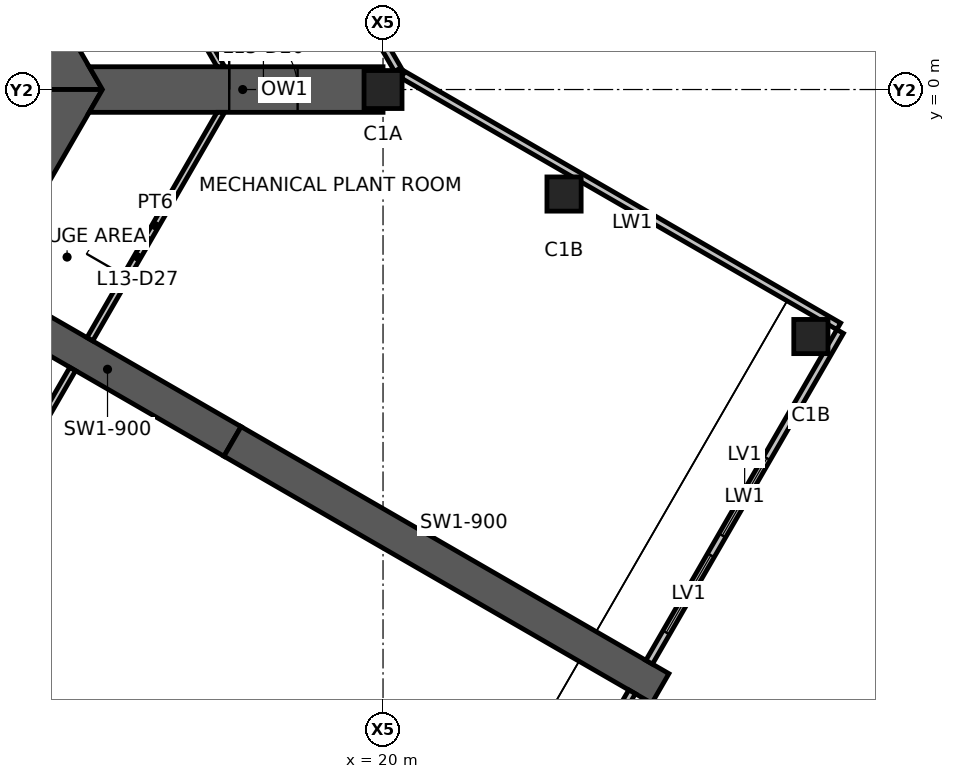
"""IFC4 building model, lengths in metres.
Left out: names, types, materials, properties, quantities, classifications, styles, units other than length and angle.
Written with IfcOpenShell. Run it as: python <this file> out.ifc"""

import sys

from ifc_helpers import new_model, si_unit, direction, frame, frame_2d, origin, origin_2d, place, context, subcontext, project, spatial, polyline, rectangle, hollow_rectangle, outline, extrude, element, fill, save


model = new_model("IFC4")
c1 = context("Model", 3, precision=1e-05, world=origin(), true_north=direction((0.0, 1.0)))
c2 = subcontext(c1, "Body", "Model", "MODEL_VIEW")
j1 = project(units=[si_unit("LENGTHUNIT", "METRE"), si_unit("PLANEANGLEUNIT", "RADIAN")], contexts=[c1])
p1 = place(None, origin())
s1 = spatial("IfcSite", under=j1, at=p1, CompositionType="ELEMENT")
p2 = place(p1, origin())
s2 = spatial("IfcBuilding", under=s1, at=p2, CompositionType="ELEMENT")
p3 = place(p2, frame((0.0, 0.0, 52.0)))
s3 = spatial("IfcBuildingStorey", under=s2, at=p3, CompositionType="ELEMENT", Elevation=52.0)
p4 = place(p3, frame((20.0, 0.0, 0.0), z_axis=(0.0, 0.0, 1.0), x_axis=(1.0, 0.0, 0.0)))
e1 = element("IfcColumn", 1, at=p4, inside=s3, PredefinedType="COLUMN", context=c2, shape_type="SweptSolid", body=[
    extrude(hollow_rectangle(XDim=1.0, YDim=1.0, WallThickness=0.06, at=origin_2d()), origin(), (0.0, 0.0, 1.0), 5.0),
])
for number, where, z_axis, x_axis in (
    (2, (24.763, -2.75, 0.0), (0.0, 0.0, 1.0), (1.0, 0.0, 0.0)),
    (3, (31.258, -6.5, 0.0), (0.0, 0.0, 1.0), (1.0, 0.0, 0.0)),
):
    element("IfcColumn", number, at=place(p3, frame(where, z_axis=z_axis, x_axis=x_axis)), inside=s3, PredefinedType="COLUMN", context=c2, shape_type="SweptSolid", body=[
        extrude(hollow_rectangle(XDim=0.9, YDim=0.9, WallThickness=0.05, at=origin_2d()), origin(), (0.0, 0.0, 1.0), 5.0),
    ])
p5 = place(p3, frame((11.922, 0.0, 0.0), z_axis=(0.0, 0.0, 1.0), x_axis=(-0.500004296715, 0.866022923061, 0.0)))
e4 = element("IfcWall", 4, at=p5, inside=s3, PredefinedType="SHEAR", context=c2, shape_type="SweptSolid", body=[
    extrude(outline(polyline([(-0.346, -0.6), (5.835, -0.6), (6.635, -0.6), (12.269, -0.6), (11.576, 0.6), (6.635, 0.6), (5.835, 0.6), (0.346, 0.6), (-0.346, -0.6)])), origin(), (0.0, 0.0, 1.0), 5.0),
])
p6 = place(p5, frame((5.835, 0.0, 0.0)))
e5 = element("IfcOpeningElement", 5, at=p6, cuts=e4, PredefinedType="OPENING", context=c2, shape_type="SweptSolid", body=[
    extrude(rectangle(XDim=0.8, YDim=2.1, at=frame_2d((0.4, 1.05))), frame((0.0, 0.61, 0.0), z_axis=(0.0, -1.0, 0.0), x_axis=(1.0, 0.0, 0.0)), (0.0, 0.0, 1.0), 1.22),
])
p7 = place(p3, frame((5.961, -10.325, 0.0), z_axis=(0.0, 0.0, 1.0), x_axis=(0.500004296715, 0.866022923061, 0.0)))
e6 = element("IfcWall", 6, at=p7, inside=s3, PredefinedType="SHEAR", context=c2, shape_type="SweptSolid", body=[
    extrude(outline(polyline([(-0.346, -0.6), (3.208, -0.6), (4.009, -0.6), (12.269, -0.6), (11.576, 0.6), (4.009, 0.6), (3.208, 0.6), (0.346, 0.6), (-0.346, -0.6)])), origin(), (0.0, 0.0, 1.0), 5.0),
])
p8 = place(p7, frame((3.208, 0.0, 0.0)))
e7 = element("IfcOpeningElement", 7, at=p8, cuts=e6, PredefinedType="OPENING", context=c2, shape_type="SweptSolid", body=[
    extrude(rectangle(XDim=0.8, YDim=2.1, at=frame_2d((0.4, 1.05))), frame((0.0, 0.61, 0.0), z_axis=(0.0, -1.0, 0.0), x_axis=(1.0, 0.0, 0.0)), (0.0, 0.0, 1.0), 1.22),
])
p9 = place(p3, frame((9.461, -5.462, 0.0), z_axis=(0.0, 0.0, 1.0), x_axis=(0.866019116917, -0.500010889016, 0.0)))
e8 = element("IfcWall", 8, at=p9, inside=s3, PredefinedType="SHEAR", context=c2, shape_type="SweptSolid", body=[
    extrude(rectangle(XDim=7.595, YDim=0.9, at=frame_2d((3.798, 0.0))), origin(), (0.0, 0.0, 1.0), 5.0),
])
p10 = place(p9, frame((0.8, 0.0, 0.0)))
e9 = element("IfcOpeningElement", 9, at=p10, cuts=e8, PredefinedType="OPENING", context=c2, shape_type="SweptSolid", body=[
    extrude(rectangle(XDim=1.0, YDim=2.1, at=frame_2d((0.5, 1.05))), frame((0.0, 0.46, 0.0), z_axis=(0.0, -1.0, 0.0), x_axis=(1.0, 0.0, 0.0)), (0.0, 0.0, 1.0), 0.92),
])
p11 = place(p3, frame((16.039, -9.26, 0.0), z_axis=(0.0, 0.0, 1.0), x_axis=(0.866024837091, -0.50000098154, 0.0)))
e10 = element("IfcWall", 10, at=p11, inside=s3, PredefinedType="SHEAR", context=c2, shape_type="SweptSolid", body=[
    extrude(rectangle(XDim=13.0, YDim=0.9, at=frame_2d((6.5, 0.0))), origin(), (0.0, 0.0, 1.0), 5.0),
])
p12 = place(p3, frame((12.615, 0.0, -1.15), z_axis=(0.0, 0.0, 1.0), x_axis=(1.0, 0.0, 0.0)))
e11 = element("IfcWall", 11, at=p12, inside=s3, PredefinedType="SHEAR", context=c2, shape_type="SweptSolid", body=[
    extrude(outline(polyline([(-0.346, -0.6), (3.338, -0.6), (5.138, -0.6), (7.385, -0.6), (7.385, 0.6), (5.138, 0.6), (3.338, 0.6), (-0.346, 0.6), (0.0, 0.0), (-0.346, -0.6)])), origin(), (0.0, 0.0, 1.0), 6.15),
])
p13 = place(p12, frame((3.338, 0.0, 1.15)))
e12 = element("IfcOpeningElement", 12, at=p13, cuts=e11, PredefinedType="OPENING", context=c2, shape_type="SweptSolid", body=[
    extrude(rectangle(XDim=1.8, YDim=2.4, at=frame_2d((0.9, 1.2))), frame((0.0, 0.61, 0.0), z_axis=(0.0, -1.0, 0.0), x_axis=(1.0, 0.0, 0.0)), (0.0, 0.0, 1.0), 1.22),
])
p14 = place(p3, frame((21.528, -24.553, 0.0), z_axis=(0.0, 0.0, 1.0), x_axis=(0.500008433718, 0.866020534521, 0.0)))
e13 = element("IfcWall", 13, at=p14, inside=s3, PredefinedType="ELEMENTEDWALL", context=c2, shape_type="SweptSolid", body=[
    extrude(rectangle(XDim=10.05, YDim=0.2, at=frame_2d((5.025, 0.0))), origin(), (0.0, 0.0, 1.0), 5.0),
])
p15 = place(p14, frame((3.85, 0.0, 0.6)))
e14 = element("IfcOpeningElement", 14, at=p15, cuts=e13, PredefinedType="OPENING", context=c2, shape_type="SweptSolid", body=[
    extrude(rectangle(XDim=2.35, YDim=3.6, at=frame_2d((1.175, 1.8))), frame((0.0, 0.11, 0.0), z_axis=(0.0, -1.0, 0.0), x_axis=(1.0, 0.0, 0.0)), (0.0, 0.0, 1.0), 0.22),
])
p16 = place(p14, frame((6.8, 0.0, 0.6)))
e15 = element("IfcOpeningElement", 15, at=p16, cuts=e13, PredefinedType="OPENING", context=c2, shape_type="SweptSolid", body=[
    extrude(rectangle(XDim=2.35, YDim=3.6, at=frame_2d((1.175, 1.8))), frame((0.0, 0.11, 0.0), z_axis=(0.0, -1.0, 0.0), x_axis=(1.0, 0.0, 0.0)), (0.0, 0.0, 1.0), 0.22),
])
p17 = place(p3, frame((27.003, -15.071, 0.0), z_axis=(0.0, 0.0, 1.0), x_axis=(0.499990214365, 0.86603105345, 0.0)))
e16 = element("IfcWall", 16, at=p17, inside=s3, PredefinedType="ELEMENTEDWALL", context=c2, shape_type="SweptSolid", body=[
    extrude(rectangle(XDim=10.05, YDim=0.2, at=frame_2d((5.025, 0.0))), origin(), (0.0, 0.0, 1.0), 5.0),
])
p18 = place(p17, frame((0.9, 0.0, 0.6)))
e17 = element("IfcOpeningElement", 17, at=p18, cuts=e16, PredefinedType="OPENING", context=c2, shape_type="SweptSolid", body=[
    extrude(rectangle(XDim=2.35, YDim=3.6, at=frame_2d((1.175, 1.8))), frame((0.0, 0.11, 0.0), z_axis=(0.0, -1.0, 0.0), x_axis=(1.0, 0.0, 0.0)), (0.0, 0.0, 1.0), 0.22),
])
p19 = place(p17, frame((3.85, 0.0, 0.6)))
e18 = element("IfcOpeningElement", 18, at=p19, cuts=e16, PredefinedType="OPENING", context=c2, shape_type="SweptSolid", body=[
    extrude(rectangle(XDim=2.35, YDim=3.6, at=frame_2d((1.175, 1.8))), frame((0.0, 0.11, 0.0), z_axis=(0.0, -1.0, 0.0), x_axis=(1.0, 0.0, 0.0)), (0.0, 0.0, 1.0), 0.22),
])
p20 = place(p3, frame((31.991, -6.23, 0.0), z_axis=(0.0, 0.0, 1.0), x_axis=(-0.86602620781, 0.499998607384, 0.0)))
e19 = element("IfcWall", 19, at=p20, inside=s3, PredefinedType="ELEMENTEDWALL", context=c2, shape_type="SweptSolid", body=[
    extrude(rectangle(XDim=13.239, YDim=0.2, at=frame_2d((6.62, 0.0))), origin(), (0.0, 0.0, 1.0), 5.0),
])
p21 = place(p3, frame((20.389, 0.526, 0.0), z_axis=(0.0, 0.0, 1.0), x_axis=(-0.499999841607, 0.866025495233, 0.0)))
e20 = element("IfcWall", 20, at=p21, inside=s3, PredefinedType="ELEMENTEDWALL", context=c2, shape_type="SweptSolid", body=[
    extrude(rectangle(XDim=19.479, YDim=0.2, at=frame_2d((9.739, 0.0))), origin(), (0.0, 0.0, 1.0), 5.0),
])
p22 = place(p3, frame((15.733, 0.6, 0.0), z_axis=(0.0, 0.0, 1.0), x_axis=(-0.49999908555, 0.866025931742, 0.0)))
e21 = element("IfcWall", 21, at=p22, inside=s3, PredefinedType="PARTITIONING", context=c2, shape_type="SweptSolid", body=[
    extrude(outline(polyline([(-0.051, -0.087), (1.213, -0.087), (2.413, -0.087), (14.744, -0.087), (14.643, 0.087), (2.413, 0.087), (1.213, 0.087), (0.051, 0.087), (-0.051, -0.087)])), origin(), (0.0, 0.0, 1.0), 4.83),
])
p23 = place(p22, frame((1.213, 0.0, 0.0)))
e22 = element("IfcOpeningElement", 22, at=p23, cuts=e21, PredefinedType="OPENING", context=c2, shape_type="SweptSolid", body=[
    extrude(rectangle(XDim=1.2, YDim=2.1, at=frame_2d((0.6, 1.05))), frame((0.0, 0.098, 0.0), z_axis=(0.0, -1.0, 0.0), x_axis=(1.0, 0.0, 0.0)), (0.0, 0.0, 1.0), 0.195),
])
p24 = place(p3, frame((12.287, -6.569, 0.0), z_axis=(0.0, 0.0, 1.0), x_axis=(0.49998719302, 0.866032797772, 0.0)))
e23 = element("IfcWall", 23, at=p24, inside=s3, PredefinedType="PARTITIONING", context=c2, shape_type="SweptSolid", body=[
    extrude(outline(polyline([(0.0, -0.087), (1.9, -0.087), (3.1, -0.087), (6.942, -0.087), (6.841, 0.087), (3.1, 0.087), (1.9, 0.087), (0.0, 0.087), (0.0, -0.087)])), origin(), (0.0, 0.0, 1.0), 4.83),
])
p25 = place(p24, frame((1.9, 0.0, 0.0)))
e24 = element("IfcOpeningElement", 24, at=p25, cuts=e23, PredefinedType="OPENING", context=c2, shape_type="SweptSolid", body=[
    extrude(rectangle(XDim=1.2, YDim=2.1, at=frame_2d((0.6, 1.05))), frame((0.0, 0.098, 0.0), z_axis=(0.0, -1.0, 0.0), x_axis=(1.0, 0.0, 0.0)), (0.0, 0.0, 1.0), 0.195),
])
p26 = place(p3, frame((8.386, -13.325, 0.0), z_axis=(0.0, 0.0, 1.0), x_axis=(0.49998719302, 0.866032797772, 0.0)))
e25 = element("IfcWall", 25, at=p26, inside=s3, PredefinedType="PARTITIONING", context=c2, shape_type="SweptSolid", body=[
    extrude(outline(polyline([(-0.051, -0.087), (6.892, -0.087), (6.892, 0.087), (0.051, 0.087), (-0.051, -0.087)])), origin(), (0.0, 0.0, 1.0), 4.83),
])
p27 = place(p18, origin())
e26 = element("IfcWindow", 26, at=p27, inside=s3, PartitioningType="SINGLE_PANEL", PredefinedType="USERDEFINED", context=c2, shape_type="SweptSolid", body=[
    extrude(rectangle(XDim=2.35, YDim=3.6, at=frame_2d((1.175, 1.8))), frame((0.0, 0.03, 0.0), z_axis=(0.0, -1.0, 0.0), x_axis=(1.0, 0.0, 0.0)), (0.0, 0.0, 1.0), 0.06),
])
fill(e17, e26)
p28 = place(p19, origin())
e27 = element("IfcWindow", 27, at=p28, inside=s3, PartitioningType="SINGLE_PANEL", PredefinedType="USERDEFINED", context=c2, shape_type="SweptSolid", body=[
    extrude(rectangle(XDim=2.35, YDim=3.6, at=frame_2d((1.175, 1.8))), frame((0.0, 0.03, 0.0), z_axis=(0.0, -1.0, 0.0), x_axis=(1.0, 0.0, 0.0)), (0.0, 0.0, 1.0), 0.06),
])
fill(e18, e27)
p29 = place(p13, origin())
e28 = element("IfcDoor", 28, at=p29, inside=s3, OperationType="DOUBLE_DOOR_SINGLE_SWING", PredefinedType="DOOR", context=c2, shape_type="SweptSolid", body=[
    extrude(rectangle(XDim=1.8, YDim=2.4, at=frame_2d((0.9, 1.2))), frame((0.0, 0.025, 0.0), z_axis=(0.0, -1.0, 0.0), x_axis=(1.0, 0.0, 0.0)), (0.0, 0.0, 1.0), 0.05),
])
fill(e12, e28)
p30 = place(p25, origin())
e29 = element("IfcDoor", 29, at=p30, inside=s3, OperationType="DOUBLE_DOOR_SINGLE_SWING", PredefinedType="DOOR", context=c2, shape_type="SweptSolid", body=[
    extrude(rectangle(XDim=1.2, YDim=2.1, at=frame_2d((0.6, 1.05))), frame((0.0, 0.025, 0.0), z_axis=(0.0, -1.0, 0.0), x_axis=(1.0, 0.0, 0.0)), (0.0, 0.0, 1.0), 0.05),
])
fill(e24, e29)
save(model, sys.argv[1])
